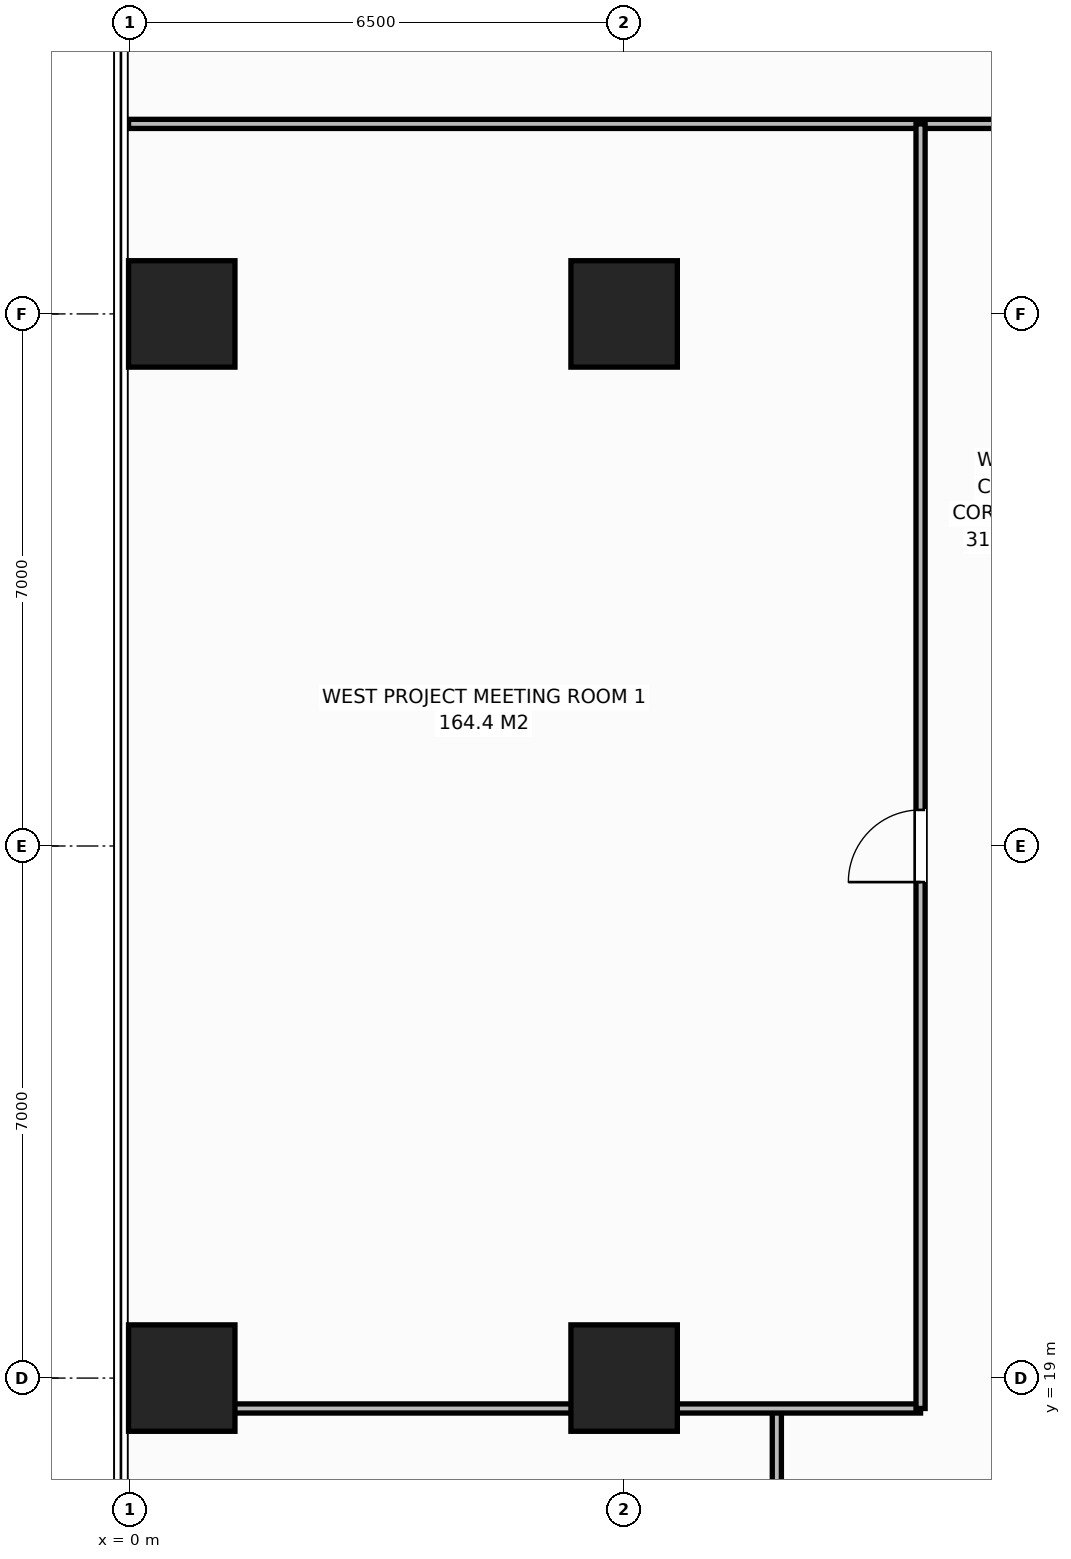
"""IFC4 building model, lengths in metres.
Left out: names, types, materials, properties, quantities, classifications, styles, units other than length and angle.
Written with IfcOpenShell. Run it as: python <this file> out.ifc"""

import sys

from ifc_helpers import new_model, si_unit, direction, frame, frame_2d, origin, origin_2d, place, context, subcontext, project, spatial, rectangle, extrude, element, fill, save


model = new_model("IFC4")
c1 = context("Model", 3, precision=1e-05, world=origin(), true_north=direction((0.0, 1.0)))
c2 = subcontext(c1, "Body", "Model", "MODEL_VIEW")
j1 = project(units=[si_unit("LENGTHUNIT", "METRE"), si_unit("PLANEANGLEUNIT", "RADIAN")], contexts=[c1])
p1 = place(None, origin())
s1 = spatial("IfcSite", under=j1, at=p1, CompositionType="ELEMENT")
p2 = place(p1, origin())
s2 = spatial("IfcBuilding", under=s1, at=p2, CompositionType="ELEMENT")
p3 = place(p2, frame((0.0, 0.0, 62.0)))
s3 = spatial("IfcBuildingStorey", under=s2, at=p3, CompositionType="ELEMENT", Elevation=62.0)
for number, where, z_axis, x_axis in (
    (1, (6.5, 19.0, 0.0), (0.0, 0.0, 1.0), (1.0, 0.0, 0.0)),
    (2, (6.5, 33.0, 0.0), (0.0, 0.0, 1.0), (1.0, 0.0, 0.0)),
    (3, (0.68, 19.0, 0.0), (0.0, 0.0, 1.0), (1.0, 0.0, 0.0)),
    (4, (0.68, 33.0, 0.0), (0.0, 0.0, 1.0), (1.0, 0.0, 0.0)),
):
    element("IfcColumn", number, at=place(p3, frame(where, z_axis=z_axis, x_axis=x_axis)), inside=s3, PredefinedType="COLUMN", context=c2, shape_type="SweptSolid", body=[
        extrude(rectangle(XDim=1.4, YDim=1.4, at=origin_2d()), origin(), (0.0, 0.0, 1.0), 3.8),
    ])
p4 = place(p3, frame((8.509, 16.5, 0.0), z_axis=(0.0, 0.0, 1.0), x_axis=(0.0, 1.0, 0.0)))
e5 = element("IfcWall", 5, at=p4, inside=s3, PredefinedType="PARTITIONING", context=c2, shape_type="SweptSolid", body=[
    extrude(rectangle(XDim=2.1, YDim=0.12, at=frame_2d((1.05, 0.0))), origin(), (0.0, 0.0, 1.0), 3.55),
])
p5 = place(p3, frame((-0.02, 35.5, 0.0), z_axis=(0.0, 0.0, 1.0), x_axis=(1.0, 0.0, 0.0)))
e6 = element("IfcWall", 6, at=p5, inside=s3, PredefinedType="PARTITIONING", context=c2, shape_type="SweptSolid", body=[
    extrude(rectangle(XDim=21.136, YDim=0.12, at=frame_2d((10.568, 0.0))), origin(), (0.0, 0.0, 1.0), 3.55),
])
p6 = place(p5, frame((15.303, 0.0, 0.0)))
e7 = element("IfcOpeningElement", 7, at=p6, cuts=e6, PredefinedType="OPENING", context=c2, shape_type="SweptSolid", body=[
    extrude(rectangle(XDim=0.95, YDim=2.15, at=frame_2d((0.475, 1.075))), frame((0.0, 0.07, 0.0), z_axis=(0.0, -1.0, 0.0), x_axis=(1.0, 0.0, 0.0)), (0.0, 0.0, 1.0), 0.14),
])
p7 = place(p3, frame((-0.18, 18.6, 0.0), z_axis=(0.0, 0.0, 1.0), x_axis=(1.0, 0.0, 0.0)))
e8 = element("IfcWall", 8, at=p7, inside=s3, PredefinedType="PARTITIONING", context=c2, shape_type="SweptSolid", body=[
    extrude(rectangle(XDim=10.58, YDim=0.12, at=frame_2d((5.29, 0.0))), origin(), (0.0, 0.0, 1.0), 3.55),
])
p8 = place(p3, frame((10.4, 18.6, 0.0), z_axis=(0.0, 0.0, 1.0), x_axis=(0.0, 1.0, 0.0)))
e9 = element("IfcWall", 9, at=p8, inside=s3, PredefinedType="PARTITIONING", context=c2, shape_type="SweptSolid", body=[
    extrude(rectangle(XDim=16.9, YDim=0.12, at=frame_2d((8.45, 0.0))), origin(), (0.0, 0.0, 1.0), 3.55),
])
p9 = place(p8, frame((6.925, 0.0, 0.0)))
e10 = element("IfcOpeningElement", 10, at=p9, cuts=e9, PredefinedType="OPENING", context=c2, shape_type="SweptSolid", body=[
    extrude(rectangle(XDim=0.95, YDim=2.15, at=frame_2d((0.475, 1.075))), frame((0.0, 0.07, 0.0), z_axis=(0.0, -1.0, 0.0), x_axis=(1.0, 0.0, 0.0)), (0.0, 0.0, 1.0), 0.14),
])
p10 = place(p9, origin())
e11 = element("IfcDoor", 11, at=p10, inside=s3, OperationType="SINGLE_SWING_LEFT", PredefinedType="DOOR", context=c2, shape_type="SweptSolid", body=[
    extrude(rectangle(XDim=0.95, YDim=2.15, at=frame_2d((0.475, 1.075))), frame((0.0, 0.025, 0.0), z_axis=(0.0, -1.0, 0.0), x_axis=(1.0, 0.0, 0.0)), (0.0, 0.0, 1.0), 0.05),
])
fill(e10, e11)
save(model, sys.argv[1])
